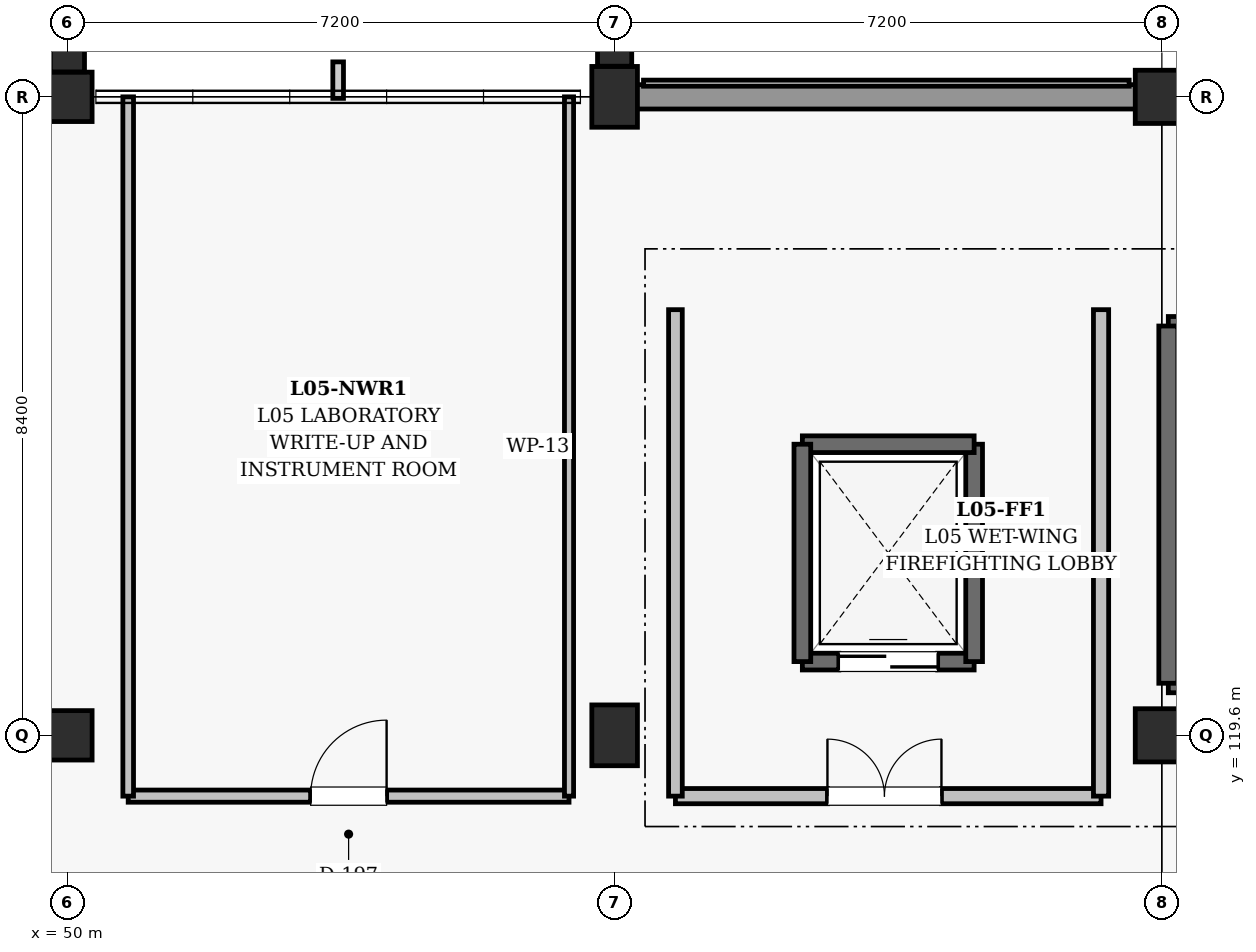
"""IFC4 building model, lengths in metres.
Left out: names, types, materials, properties, quantities, classifications, styles, units other than length and angle.
Written with IfcOpenShell. Run it as: python <this file> out.ifc"""

import sys

from ifc_helpers import new_model, si_unit, direction, frame, frame_2d, origin, origin_2d, place, context, subcontext, project, spatial, rectangle, extrude, element, fill, save


model = new_model("IFC4")
c1 = context("Model", 3, precision=1e-05, world=origin(), true_north=direction((0.0, 1.0)))
c2 = subcontext(c1, "Body", "Model", "MODEL_VIEW")
j1 = project(units=[si_unit("LENGTHUNIT", "METRE"), si_unit("PLANEANGLEUNIT", "RADIAN")], contexts=[c1])
p1 = place(None, origin())
s1 = spatial("IfcSite", under=j1, at=p1, CompositionType="ELEMENT")
p2 = place(p1, origin())
s2 = spatial("IfcBuilding", under=s1, at=p2, CompositionType="ELEMENT")
p3 = place(p2, frame((0.0, 0.0, 23.4)))
s3 = spatial("IfcBuildingStorey", under=s2, at=p3, CompositionType="ELEMENT", Elevation=23.4)
for number, where, z_axis, x_axis in (
    (1, (50.0, 119.6, 0.0), (0.0, 0.0, 1.0), (1.0, 0.0, 0.0)),
    (2, (50.0, 128.0, 0.0), (0.0, 0.0, 1.0), (1.0, 0.0, 0.0)),
):
    element("IfcColumn", number, at=place(p3, frame(where, z_axis=z_axis, x_axis=x_axis)), inside=s3, PredefinedType="COLUMN", context=c2, shape_type="SweptSolid", body=[
        extrude(rectangle(XDim=0.65, YDim=0.65, at=origin_2d()), origin(), (0.0, 0.0, 1.0), 4.5),
    ])
for number, where, z_axis, x_axis in (
    (3, (57.2, 119.6, 0.0), (0.0, 0.0, 1.0), (1.0, 0.0, 0.0)),
    (4, (57.2, 128.0, 0.0), (0.0, 0.0, 1.0), (1.0, 0.0, 0.0)),
):
    element("IfcColumn", number, at=place(p3, frame(where, z_axis=z_axis, x_axis=x_axis)), inside=s3, PredefinedType="COLUMN", context=c2, shape_type="SweptSolid", body=[
        extrude(rectangle(XDim=0.6, YDim=0.8, at=origin_2d()), origin(), (0.0, 0.0, 1.0), 4.5),
    ])
for number, where, z_axis, x_axis in (
    (5, (64.4, 119.6, 0.0), (0.0, 0.0, 1.0), (1.0, 0.0, 0.0)),
    (6, (64.4, 128.0, 0.0), (0.0, 0.0, 1.0), (1.0, 0.0, 0.0)),
):
    element("IfcColumn", number, at=place(p3, frame(where, z_axis=z_axis, x_axis=x_axis)), inside=s3, PredefinedType="COLUMN", context=c2, shape_type="SweptSolid", body=[
        extrude(rectangle(XDim=0.7, YDim=0.7, at=origin_2d()), origin(), (0.0, 0.0, 1.0), 4.5),
    ])
for number, where, z_axis, x_axis in (
    (7, (50.0, 128.653, 0.0), (0.0, 0.0, 1.0), (1.0, 0.0, 0.0)),
    (8, (57.2, 128.728, 0.0), (0.0, 0.0, 1.0), (1.0, 0.0, 0.0)),
):
    element("IfcColumn", number, at=place(p3, frame(where, z_axis=z_axis, x_axis=x_axis)), inside=s3, PredefinedType="PILASTER", context=c2, shape_type="SweptSolid", body=[
        extrude(rectangle(XDim=0.45, YDim=0.65, at=origin_2d()), origin(), (0.0, 0.0, 1.0), 4.5),
    ])
p4 = place(p3, frame((57.48, 128.0, 0.0), z_axis=(0.0, 0.0, 1.0), x_axis=(1.0, 0.0, 0.0)))
e9 = element("IfcWall", 9, at=p4, inside=s3, PredefinedType="SOLIDWALL", context=c2, shape_type="SweptSolid", body=[
    extrude(rectangle(XDim=6.59, YDim=0.32, at=frame_2d((3.295, 0.0))), origin(), (0.0, 0.0, 1.0), 3.305),
])
p5 = place(p3, frame((64.485, 120.285, 0.0), z_axis=(0.0, 0.0, 1.0), x_axis=(1.0, 0.0, 0.0)))
e10 = element("IfcWall", 10, at=p5, inside=s3, PredefinedType="SHEAR", context=c2, shape_type="SweptSolid", body=[
    extrude(rectangle(XDim=10.63, YDim=0.25, at=frame_2d((5.315, 0.0))), origin(), (0.0, 0.0, 1.0), 4.175),
])
p6 = place(p5, frame((0.55, 0.0, 0.0)))
e11 = element("IfcOpeningElement", 11, at=p6, cuts=e10, PredefinedType="OPENING", context=c2, shape_type="SweptSolid", body=[
    extrude(rectangle(XDim=1.2, YDim=2.15, at=frame_2d((0.6, 1.075))), frame((0.0, 0.135, 0.0), z_axis=(0.0, -1.0, 0.0), x_axis=(1.0, 0.0, 0.0)), (0.0, 0.0, 1.0), 0.27),
])
p7 = place(p3, frame((75.115, 124.985, 0.0), z_axis=(0.0, 0.0, 1.0), x_axis=(-1.0, 0.0, 0.0)))
e12 = element("IfcWall", 12, at=p7, inside=s3, PredefinedType="SHEAR", context=c2, shape_type="SweptSolid", body=[
    extrude(rectangle(XDim=10.63, YDim=0.25, at=frame_2d((5.315, 0.0))), origin(), (0.0, 0.0, 1.0), 4.175),
])
p8 = place(p3, frame((64.485, 124.985, 0.0), z_axis=(0.0, 0.0, 1.0), x_axis=(0.0, -1.0, 0.0)))
e13 = element("IfcWall", 13, at=p8, inside=s3, PredefinedType="SHEAR", context=c2, shape_type="SweptSolid", body=[
    extrude(rectangle(XDim=4.7, YDim=0.25, at=frame_2d((2.35, 0.0))), origin(), (0.0, 0.0, 1.0), 4.175),
])
p9 = place(p3, frame((59.67, 120.57, 0.0), z_axis=(0.0, 0.0, 1.0), x_axis=(1.0, 0.0, 0.0)))
e14 = element("IfcWall", 14, at=p9, inside=s3, PredefinedType="SHEAR", context=c2, shape_type="SweptSolid", body=[
    extrude(rectangle(XDim=2.26, YDim=0.22, at=frame_2d((1.13, 0.0))), origin(), (0.0, 0.0, 1.0), 4.175),
])
p10 = place(p9, frame((0.48, 0.0, 0.0)))
e15 = element("IfcOpeningElement", 15, at=p10, cuts=e14, PredefinedType="OPENING", context=c2, shape_type="SweptSolid", body=[
    extrude(rectangle(XDim=1.3, YDim=2.2, at=frame_2d((0.65, 1.1))), frame((0.0, 0.12, 0.0), z_axis=(0.0, -1.0, 0.0), x_axis=(1.0, 0.0, 0.0)), (0.0, 0.0, 1.0), 0.24),
])
p11 = place(p3, frame((61.93, 120.57, 0.0), z_axis=(0.0, 0.0, 1.0), x_axis=(0.0, 1.0, 0.0)))
e16 = element("IfcWall", 16, at=p11, inside=s3, PredefinedType="SHEAR", context=c2, shape_type="SweptSolid", body=[
    extrude(rectangle(XDim=2.86, YDim=0.22, at=frame_2d((1.43, 0.0))), origin(), (0.0, 0.0, 1.0), 4.175),
])
p12 = place(p3, frame((61.93, 123.43, 0.0), z_axis=(0.0, 0.0, 1.0), x_axis=(-1.0, 0.0, 0.0)))
e17 = element("IfcWall", 17, at=p12, inside=s3, PredefinedType="SHEAR", context=c2, shape_type="SweptSolid", body=[
    extrude(rectangle(XDim=2.26, YDim=0.22, at=frame_2d((1.13, 0.0))), origin(), (0.0, 0.0, 1.0), 4.175),
])
p13 = place(p3, frame((59.67, 123.43, 0.0), z_axis=(0.0, 0.0, 1.0), x_axis=(0.0, -1.0, 0.0)))
e18 = element("IfcWall", 18, at=p13, inside=s3, PredefinedType="SHEAR", context=c2, shape_type="SweptSolid", body=[
    extrude(rectangle(XDim=2.86, YDim=0.22, at=frame_2d((1.43, 0.0))), origin(), (0.0, 0.0, 1.0), 4.175),
])
p14 = place(p3, frame((58.0, 118.8, 0.0), z_axis=(0.0, 0.0, 1.0), x_axis=(1.0, 0.0, 0.0)))
e19 = element("IfcWall", 19, at=p14, inside=s3, PredefinedType="SOLIDWALL", context=c2, shape_type="SweptSolid", body=[
    extrude(rectangle(XDim=5.6, YDim=0.2, at=frame_2d((2.8, 0.0))), origin(), (0.0, 0.0, 1.0), 3.54),
])
p15 = place(p14, frame((2.0, 0.0, 0.0)))
e20 = element("IfcOpeningElement", 20, at=p15, cuts=e19, PredefinedType="OPENING", context=c2, shape_type="SweptSolid", body=[
    extrude(rectangle(XDim=1.5, YDim=2.2, at=frame_2d((0.75, 1.1))), frame((0.0, 0.11, 0.0), z_axis=(0.0, -1.0, 0.0), x_axis=(1.0, 0.0, 0.0)), (0.0, 0.0, 1.0), 0.22),
])
p16 = place(p3, frame((58.0, 118.8, 0.0), z_axis=(0.0, 0.0, 1.0), x_axis=(0.0, 1.0, 0.0)))
e21 = element("IfcWall", 21, at=p16, inside=s3, PredefinedType="SOLIDWALL", context=c2, shape_type="SweptSolid", body=[
    extrude(rectangle(XDim=6.4, YDim=0.18, at=frame_2d((3.2, 0.0))), origin(), (0.0, 0.0, 1.0), 3.36),
])
p17 = place(p3, frame((63.6, 118.8, 0.0), z_axis=(0.0, 0.0, 1.0), x_axis=(0.0, 1.0, 0.0)))
e22 = element("IfcWall", 22, at=p17, inside=s3, PredefinedType="SOLIDWALL", context=c2, shape_type="SweptSolid", body=[
    extrude(rectangle(XDim=6.4, YDim=0.2, at=frame_2d((3.2, 0.0))), origin(), (0.0, 0.0, 1.0), 3.36),
])
p18 = place(p3, frame((50.8, 118.8, 0.0), z_axis=(0.0, 0.0, 1.0), x_axis=(1.0, 0.0, 0.0)))
e23 = element("IfcWall", 23, at=p18, inside=s3, PredefinedType="PARTITIONING", context=c2, shape_type="SweptSolid", body=[
    extrude(rectangle(XDim=5.8, YDim=0.16, at=frame_2d((2.9, 0.0))), origin(), (0.0, 0.0, 1.0), 3.54),
])
p19 = place(p18, frame((2.4, 0.0, 0.0)))
e24 = element("IfcOpeningElement", 24, at=p19, cuts=e23, PredefinedType="OPENING", context=c2, shape_type="SweptSolid", body=[
    extrude(rectangle(XDim=1.0, YDim=2.15, at=frame_2d((0.5, 1.075))), frame((0.0, 0.09, 0.0), z_axis=(0.0, -1.0, 0.0), x_axis=(1.0, 0.0, 0.0)), (0.0, 0.0, 1.0), 0.18),
])
p20 = place(p3, frame((50.8, 118.8, 0.0), z_axis=(0.0, 0.0, 1.0), x_axis=(0.0, 1.0, 0.0)))
e25 = element("IfcWall", 25, at=p20, inside=s3, PredefinedType="PARTITIONING", context=c2, shape_type="SweptSolid", body=[
    extrude(rectangle(XDim=9.2, YDim=0.14, at=frame_2d((4.6, 0.0))), origin(), (0.0, 0.0, 1.0), 3.41),
])
p21 = place(p3, frame((56.6, 118.8, 0.0), z_axis=(0.0, 0.0, 1.0), x_axis=(0.0, 1.0, 0.0)))
e26 = element("IfcWall", 26, at=p21, inside=s3, PredefinedType="PARTITIONING", context=c2, shape_type="SweptSolid", body=[
    extrude(rectangle(XDim=9.2, YDim=0.12, at=frame_2d((4.6, 0.0))), origin(), (0.0, 0.0, 1.0), 3.41),
])
p22 = place(p10, origin())
e27 = element("IfcDoor", 27, at=p22, inside=s3, OperationType="DOUBLE_DOOR_SLIDING", PredefinedType="DOOR", context=c2, shape_type="SweptSolid", body=[
    extrude(rectangle(XDim=1.3, YDim=2.2, at=frame_2d((0.65, 1.1))), frame((0.0, 0.025, 0.0), z_axis=(0.0, -1.0, 0.0), x_axis=(1.0, 0.0, 0.0)), (0.0, 0.0, 1.0), 0.05),
])
fill(e15, e27)
p23 = place(p15, origin())
e28 = element("IfcDoor", 28, at=p23, inside=s3, OperationType="DOUBLE_DOOR_SINGLE_SWING", PredefinedType="DOOR", context=c2, shape_type="SweptSolid", body=[
    extrude(rectangle(XDim=1.5, YDim=2.2, at=frame_2d((0.75, 1.1))), frame((0.0, 0.025, 0.0), z_axis=(0.0, -1.0, 0.0), x_axis=(1.0, 0.0, 0.0)), (0.0, 0.0, 1.0), 0.05),
])
fill(e20, e28)
p24 = place(p19, origin())
e29 = element("IfcDoor", 29, at=p24, inside=s3, OperationType="SINGLE_SWING_RIGHT", PredefinedType="DOOR", context=c2, shape_type="SweptSolid", body=[
    extrude(rectangle(XDim=1.0, YDim=2.15, at=frame_2d((0.5, 1.075))), frame((0.0, 0.025, 0.0), z_axis=(0.0, -1.0, 0.0), x_axis=(1.0, 0.0, 0.0)), (0.0, 0.0, 1.0), 0.05),
])
fill(e24, e29)
save(model, sys.argv[1])
